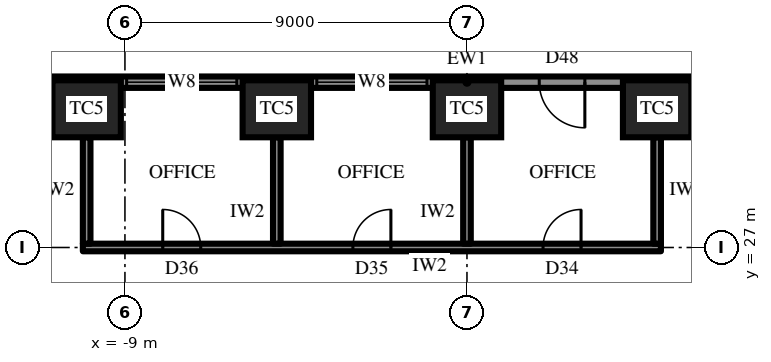
"""IFC4 building model, lengths in metres.
Left out: names, types, materials, properties, quantities, classifications, styles, units other than length and angle.
Written with IfcOpenShell. Run it as: python <this file> out.ifc"""

import sys

from ifc_helpers import new_model, si_unit, direction, frame, frame_2d, origin, origin_2d, place, context, subcontext, project, spatial, rectangle, extrude, element, fill, save


model = new_model("IFC4")
c1 = context("Model", 3, precision=1e-05, world=origin(), true_north=direction((0.0, 1.0)))
c2 = subcontext(c1, "Body", "Model", "MODEL_VIEW")
j1 = project(units=[si_unit("LENGTHUNIT", "METRE"), si_unit("PLANEANGLEUNIT", "RADIAN")], contexts=[c1])
p1 = place(None, origin())
s1 = spatial("IfcSite", under=j1, at=p1, CompositionType="ELEMENT")
p2 = place(p1, origin())
s2 = spatial("IfcBuilding", under=s1, at=p2, CompositionType="ELEMENT")
p3 = place(p2, frame((0.0, 0.0, 127.9)))
s3 = spatial("IfcBuildingStorey", under=s2, at=p3, CompositionType="ELEMENT", Elevation=127.9)
for number, where, z_axis, x_axis in (
    (1, (5.004, 30.65, 0.0), (0.0, 0.0, 1.0), (-1.0, 0.0, 0.0)),
    (2, (0.0, 30.65, 0.0), (0.0, 0.0, 1.0), (-1.0, 0.0, 0.0)),
    (3, (-5.004, 30.65, 0.0), (0.0, 0.0, 1.0), (-1.0, 0.0, 0.0)),
    (4, (-10.007, 30.65, 0.0), (0.0, 0.0, 1.0), (-1.0, 0.0, 0.0)),
):
    element("IfcColumn", number, at=place(p3, frame(where, z_axis=z_axis, x_axis=x_axis)), inside=s3, PredefinedType="COLUMN", context=c2, shape_type="SweptSolid", body=[
        extrude(rectangle(XDim=1.8, YDim=1.5, at=origin_2d()), origin(), (0.0, 0.0, 1.0), 4.2),
    ])
p4 = place(p3, frame((15.011, 31.35, 0.0), z_axis=(0.0, 0.0, 1.0), x_axis=(-1.0, 0.0, 0.0)))
e5 = element("IfcWall", 5, at=p4, inside=s3, PredefinedType="SOLIDWALL", context=c2, shape_type="SweptSolid", body=[
    extrude(rectangle(XDim=30.022, YDim=0.3, at=frame_2d((15.011, 0.0))), origin(), (0.0, 0.0, 1.0), 2.3),
])
p5 = place(p4, frame((1.052, 0.0, 0.6)))
e6 = element("IfcOpeningElement", 6, at=p5, cuts=e5, PredefinedType="OPENING", context=c2, shape_type="SweptSolid", body=[
    extrude(rectangle(XDim=2.9, YDim=1.45, at=frame_2d((1.45, 0.725))), frame((0.0, 0.16, 0.0), z_axis=(0.0, -1.0, 0.0), x_axis=(1.0, 0.0, 0.0)), (0.0, 0.0, 1.0), 0.32),
])
p6 = place(p4, frame((6.056, 0.0, 0.6)))
e7 = element("IfcOpeningElement", 7, at=p6, cuts=e5, PredefinedType="OPENING", context=c2, shape_type="SweptSolid", body=[
    extrude(rectangle(XDim=2.9, YDim=1.45, at=frame_2d((1.45, 0.725))), frame((0.0, 0.16, 0.0), z_axis=(0.0, -1.0, 0.0), x_axis=(1.0, 0.0, 0.0)), (0.0, 0.0, 1.0), 0.32),
])
p7 = place(p4, frame((11.909, 0.0, 0.0)))
e8 = element("IfcOpeningElement", 8, at=p7, cuts=e5, PredefinedType="OPENING", context=c2, shape_type="SweptSolid", body=[
    extrude(rectangle(XDim=1.2, YDim=2.2, at=frame_2d((0.6, 1.1))), frame((0.0, 0.16, 0.0), z_axis=(0.0, -1.0, 0.0), x_axis=(1.0, 0.0, 0.0)), (0.0, 0.0, 1.0), 0.32),
])
p8 = place(p4, frame((16.063, 0.0, 0.6)))
e9 = element("IfcOpeningElement", 9, at=p8, cuts=e5, PredefinedType="OPENING", context=c2, shape_type="SweptSolid", body=[
    extrude(rectangle(XDim=2.9, YDim=1.45, at=frame_2d((1.45, 0.725))), frame((0.0, 0.16, 0.0), z_axis=(0.0, -1.0, 0.0), x_axis=(1.0, 0.0, 0.0)), (0.0, 0.0, 1.0), 0.32),
])
p9 = place(p4, frame((21.067, 0.0, 0.6)))
e10 = element("IfcOpeningElement", 10, at=p9, cuts=e5, PredefinedType="OPENING", context=c2, shape_type="SweptSolid", body=[
    extrude(rectangle(XDim=2.9, YDim=1.45, at=frame_2d((1.45, 0.725))), frame((0.0, 0.16, 0.0), z_axis=(0.0, -1.0, 0.0), x_axis=(1.0, 0.0, 0.0)), (0.0, 0.0, 1.0), 0.32),
])
p10 = place(p4, frame((26.07, 0.0, 0.6)))
e11 = element("IfcOpeningElement", 11, at=p10, cuts=e5, PredefinedType="OPENING", context=c2, shape_type="SweptSolid", body=[
    extrude(rectangle(XDim=2.9, YDim=1.45, at=frame_2d((1.45, 0.725))), frame((0.0, 0.16, 0.0), z_axis=(0.0, -1.0, 0.0), x_axis=(1.0, 0.0, 0.0)), (0.0, 0.0, 1.0), 0.32),
])
p11 = place(p3, frame((5.104, 27.0, 0.0), z_axis=(0.0, 0.0, 1.0), x_axis=(-1.0, 0.0, 0.0)))
e12 = element("IfcWall", 12, at=p11, inside=s3, PredefinedType="PARTITIONING", context=c2, shape_type="SweptSolid", body=[
    extrude(rectangle(XDim=15.211, YDim=0.2, at=frame_2d((7.605, 0.0))), origin(), (0.0, 0.0, 1.0), 4.0),
])
p12 = place(p11, frame((2.102, 0.0, 0.0)))
e13 = element("IfcOpeningElement", 13, at=p12, cuts=e12, PredefinedType="OPENING", context=c2, shape_type="SweptSolid", body=[
    extrude(rectangle(XDim=1.0, YDim=2.2, at=frame_2d((0.5, 1.1))), frame((0.0, 0.11, 0.0), z_axis=(0.0, -1.0, 0.0), x_axis=(1.0, 0.0, 0.0)), (0.0, 0.0, 1.0), 0.22),
])
p13 = place(p11, frame((7.105, 0.0, 0.0)))
e14 = element("IfcOpeningElement", 14, at=p13, cuts=e12, PredefinedType="OPENING", context=c2, shape_type="SweptSolid", body=[
    extrude(rectangle(XDim=1.0, YDim=2.2, at=frame_2d((0.5, 1.1))), frame((0.0, 0.11, 0.0), z_axis=(0.0, -1.0, 0.0), x_axis=(1.0, 0.0, 0.0)), (0.0, 0.0, 1.0), 0.22),
])
p14 = place(p11, frame((12.109, 0.0, 0.0)))
e15 = element("IfcOpeningElement", 15, at=p14, cuts=e12, PredefinedType="OPENING", context=c2, shape_type="SweptSolid", body=[
    extrude(rectangle(XDim=1.0, YDim=2.2, at=frame_2d((0.5, 1.1))), frame((0.0, 0.11, 0.0), z_axis=(0.0, -1.0, 0.0), x_axis=(1.0, 0.0, 0.0)), (0.0, 0.0, 1.0), 0.22),
])
for number, where, z_axis, x_axis in (
    (16, (5.004, 27.1, 0.0), (0.0, 0.0, 1.0), (0.0, 1.0, 0.0)),
    (17, (0.0, 27.1, 0.0), (0.0, 0.0, 1.0), (0.0, 1.0, 0.0)),
    (18, (-5.004, 27.1, 0.0), (0.0, 0.0, 1.0), (0.0, 1.0, 0.0)),
    (19, (-10.007, 27.1, 0.0), (0.0, 0.0, 1.0), (0.0, 1.0, 0.0)),
):
    element("IfcWall", number, at=place(p3, frame(where, z_axis=z_axis, x_axis=x_axis)), inside=s3, PredefinedType="PARTITIONING", context=c2, shape_type="SweptSolid", body=[
        extrude(rectangle(XDim=2.8, YDim=0.2, at=frame_2d((1.4, 0.0))), origin(), (0.0, 0.0, 1.0), 2.992),
    ])
p15 = place(p7, origin())
e20 = element("IfcDoor", 20, at=p15, inside=s3, OperationType="SINGLE_SWING_RIGHT", PredefinedType="DOOR", context=c2, shape_type="SweptSolid", body=[
    extrude(rectangle(XDim=1.2, YDim=2.2, at=frame_2d((0.6, 1.1))), frame((0.0, 0.025, 0.0), z_axis=(0.0, -1.0, 0.0), x_axis=(1.0, 0.0, 0.0)), (0.0, 0.0, 1.0), 0.05),
])
fill(e8, e20)
p16 = place(p8, origin())
e21 = element("IfcWindow", 21, at=p16, inside=s3, PartitioningType="SINGLE_PANEL", PredefinedType="WINDOW", context=c2, shape_type="SweptSolid", body=[
    extrude(rectangle(XDim=2.9, YDim=1.45, at=frame_2d((1.45, 0.725))), frame((0.0, 0.03, 0.0), z_axis=(0.0, -1.0, 0.0), x_axis=(1.0, 0.0, 0.0)), (0.0, 0.0, 1.0), 0.06),
])
fill(e9, e21)
p17 = place(p9, origin())
e22 = element("IfcWindow", 22, at=p17, inside=s3, PartitioningType="SINGLE_PANEL", PredefinedType="WINDOW", context=c2, shape_type="SweptSolid", body=[
    extrude(rectangle(XDim=2.9, YDim=1.45, at=frame_2d((1.45, 0.725))), frame((0.0, 0.03, 0.0), z_axis=(0.0, -1.0, 0.0), x_axis=(1.0, 0.0, 0.0)), (0.0, 0.0, 1.0), 0.06),
])
fill(e10, e22)
p18 = place(p12, frame((1.0, 0.0, 0.0), z_axis=(0.0, 0.0, 1.0), x_axis=(-1.0, 0.0, 0.0)))
e23 = element("IfcDoor", 23, at=p18, inside=s3, OperationType="SINGLE_SWING_LEFT", PredefinedType="DOOR", context=c2, shape_type="SweptSolid", body=[
    extrude(rectangle(XDim=1.0, YDim=2.2, at=frame_2d((0.5, 1.1))), frame((0.0, 0.025, 0.0), z_axis=(0.0, -1.0, 0.0), x_axis=(1.0, 0.0, 0.0)), (0.0, 0.0, 1.0), 0.05),
])
fill(e13, e23)
p19 = place(p13, frame((1.0, 0.0, 0.0), z_axis=(0.0, 0.0, 1.0), x_axis=(-1.0, 0.0, 0.0)))
e24 = element("IfcDoor", 24, at=p19, inside=s3, OperationType="SINGLE_SWING_LEFT", PredefinedType="DOOR", context=c2, shape_type="SweptSolid", body=[
    extrude(rectangle(XDim=1.0, YDim=2.2, at=frame_2d((0.5, 1.1))), frame((0.0, 0.025, 0.0), z_axis=(0.0, -1.0, 0.0), x_axis=(1.0, 0.0, 0.0)), (0.0, 0.0, 1.0), 0.05),
])
fill(e14, e24)
p20 = place(p14, frame((1.0, 0.0, 0.0), z_axis=(0.0, 0.0, 1.0), x_axis=(-1.0, 0.0, 0.0)))
e25 = element("IfcDoor", 25, at=p20, inside=s3, OperationType="SINGLE_SWING_RIGHT", PredefinedType="DOOR", context=c2, shape_type="SweptSolid", body=[
    extrude(rectangle(XDim=1.0, YDim=2.2, at=frame_2d((0.5, 1.1))), frame((0.0, 0.025, 0.0), z_axis=(0.0, -1.0, 0.0), x_axis=(1.0, 0.0, 0.0)), (0.0, 0.0, 1.0), 0.05),
])
fill(e15, e25)
save(model, sys.argv[1])
